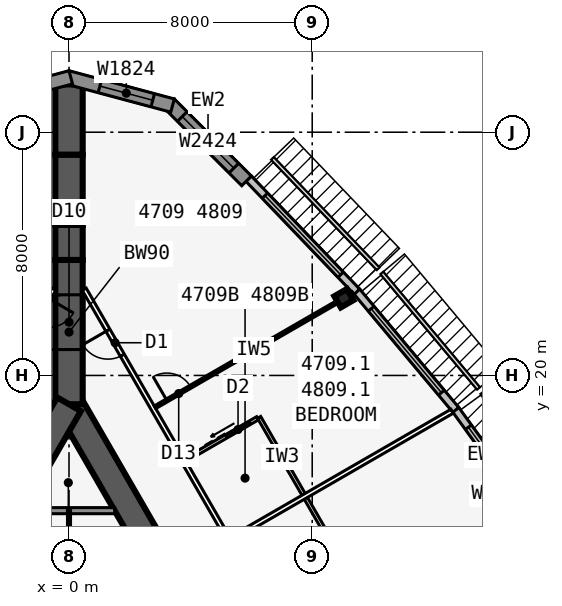
"""IFC4 building model, lengths in metres.
Left out: names, types, materials, properties, quantities, classifications, styles, units other than length and angle.
Written with IfcOpenShell. Run it as: python <this file> out.ifc"""

import sys

from ifc_helpers import new_model, si_unit, direction, frame, frame_2d, origin, origin_2d, place, context, subcontext, project, spatial, polyline, rectangle, i_section, outline, extrude, element, fill, save


model = new_model("IFC4")
c1 = context("Model", 3, precision=1e-05, world=origin(), true_north=direction((0.0, 1.0)))
c2 = subcontext(c1, "Body", "Model", "MODEL_VIEW")
j1 = project(units=[si_unit("LENGTHUNIT", "METRE"), si_unit("PLANEANGLEUNIT", "RADIAN")], contexts=[c1])
p1 = place(None, origin())
s1 = spatial("IfcSite", under=j1, at=p1, CompositionType="ELEMENT")
p2 = place(p1, origin())
s2 = spatial("IfcBuilding", under=s1, at=p2, CompositionType="ELEMENT")
p3 = place(p2, frame((0.0, 0.0, 175.9)))
s3 = spatial("IfcBuildingStorey", under=s2, at=p3, CompositionType="ELEMENT", Elevation=175.9)
p4 = place(p3, frame((16.5, -9.526, 0.0), z_axis=(0.0, 0.0, 1.0), x_axis=(-0.499999749417, 0.866025548458, 0.0)))
e1 = element("IfcWall", 1, at=p4, inside=s3, PredefinedType="SHEAR", context=c2, shape_type="SweptSolid", body=[
    extrude(rectangle(XDim=33.0, YDim=0.9, at=frame_2d((16.5, 0.0))), origin(), (0.0, 0.0, 1.0), 3.4),
])
p5 = place(p4, frame((14.15, 0.0, 0.0)))
e2 = element("IfcOpeningElement", 2, at=p5, cuts=e1, PredefinedType="OPENING", context=c2, shape_type="SweptSolid", body=[
    extrude(rectangle(XDim=1.8, YDim=2.13, at=frame_2d((0.9, 1.065))), frame((0.0, 0.46, 0.0), z_axis=(0.0, -1.0, 0.0), x_axis=(1.0, 0.0, 0.0)), (0.0, 0.0, 1.0), 0.92),
])
p6 = place(p4, frame((12.6, 0.0, 0.0)))
e3 = element("IfcOpeningElement", 3, at=p6, cuts=e1, PredefinedType="OPENING", context=c2, shape_type="SweptSolid", body=[
    extrude(rectangle(XDim=1.0, YDim=2.13, at=frame_2d((0.5, 1.065))), frame((0.0, 0.46, 0.0), z_axis=(0.0, -1.0, 0.0), x_axis=(1.0, 0.0, 0.0)), (0.0, 0.0, 1.0), 0.92),
])
p7 = place(p3, frame((0.0, 19.052, 0.0), z_axis=(0.0, 0.0, 1.0), x_axis=(-0.499999749417, -0.866025548458, 0.0)))
e4 = element("IfcWall", 4, at=p7, inside=s3, PredefinedType="SHEAR", context=c2, shape_type="SweptSolid", body=[
    extrude(rectangle(XDim=33.0, YDim=0.9, at=frame_2d((16.5, 0.0))), origin(), (0.0, 0.0, 1.0), 3.4),
])
p8 = place(p7, frame((14.15, 0.0, 0.0)))
e5 = element("IfcOpeningElement", 5, at=p8, cuts=e4, PredefinedType="OPENING", context=c2, shape_type="SweptSolid", body=[
    extrude(rectangle(XDim=1.8, YDim=2.13, at=frame_2d((0.9, 1.065))), frame((0.0, 0.46, 0.0), z_axis=(0.0, -1.0, 0.0), x_axis=(1.0, 0.0, 0.0)), (0.0, 0.0, 1.0), 0.92),
])
p9 = place(p7, frame((12.6, 0.0, 0.0)))
e6 = element("IfcOpeningElement", 6, at=p9, cuts=e4, PredefinedType="OPENING", context=c2, shape_type="SweptSolid", body=[
    extrude(rectangle(XDim=1.0, YDim=2.13, at=frame_2d((0.5, 1.065))), frame((0.0, 0.46, 0.0), z_axis=(0.0, -1.0, 0.0), x_axis=(1.0, 0.0, 0.0)), (0.0, 0.0, 1.0), 0.92),
])
p10 = place(p3, frame((0.0, 19.052, 0.0), z_axis=(0.0, 0.0, 1.0), x_axis=(0.0, 1.0, 0.0)))
e7 = element("IfcWall", 7, at=p10, inside=s3, PredefinedType="SHEAR", context=c2, shape_type="SweptSolid", body=[
    extrude(rectangle(XDim=4.746, YDim=0.9, at=frame_2d((2.373, 0.0))), origin(), (0.0, 0.0, 1.0), 3.4),
])
p11 = place(p10, frame((1.8, 0.0, 0.0)))
e8 = element("IfcOpeningElement", 8, at=p11, cuts=e7, PredefinedType="OPENING", context=c2, shape_type="SweptSolid", body=[
    extrude(rectangle(XDim=1.8, YDim=2.13, at=frame_2d((0.9, 1.065))), frame((0.0, 0.46, 0.0), z_axis=(0.0, -1.0, 0.0), x_axis=(1.0, 0.0, 0.0)), (0.0, 0.0, 1.0), 0.92),
])
p12 = place(p3, frame((0.0, 23.799, 0.0), z_axis=(0.0, 0.0, 1.0), x_axis=(0.0, 1.0, 0.0)))
e9 = element("IfcWall", 9, at=p12, inside=s3, PredefinedType="SHEAR", context=c2, shape_type="SweptSolid", body=[
    extrude(rectangle(XDim=1.155, YDim=0.9, at=frame_2d((0.577, 0.0))), origin(), (0.0, 0.0, 1.0), 3.4),
])
p13 = place(p3, frame((0.0, 24.953, 0.0), z_axis=(0.0, 0.0, 1.0), x_axis=(0.0, 1.0, 0.0)))
e10 = element("IfcWall", 10, at=p13, inside=s3, PredefinedType="SHEAR", context=c2, shape_type="SweptSolid", body=[
    extrude(rectangle(XDim=2.309, YDim=0.9, at=frame_2d((1.155, 0.0))), origin(), (0.0, 0.0, 1.0), 3.4),
])
p14 = place(p3, frame((0.0, 27.263, 0.0), z_axis=(0.0, 0.0, 1.0), x_axis=(0.0, 1.0, 0.0)))
e11 = element("IfcWall", 11, at=p14, inside=s3, PredefinedType="SHEAR", context=c2, shape_type="SweptSolid", body=[
    extrude(rectangle(XDim=2.31, YDim=0.9, at=frame_2d((1.155, 0.0))), origin(), (0.0, 0.0, 1.0), 3.4),
])
p15 = place(p3, frame((9.041, 22.541, 0.0), z_axis=(0.0, 0.0, 1.0), x_axis=(-0.5, 0.866025403784, 0.0)))
e12 = element("IfcColumn", 12, at=p15, inside=s3, PredefinedType="COLUMN", context=c2, shape_type="SweptSolid", body=[
    extrude(i_section(OverallWidth=0.424, OverallDepth=0.475, WebThickness=0.048, FlangeThickness=0.077, at=origin_2d()), origin(), (0.0, 0.0, 1.0), 3.4),
])
p16 = place(p3, frame((15.672, 14.807, 0.0), z_axis=(0.0, 0.0, 1.0), x_axis=(-0.587669188412, 0.809101307001, 0.0)))
e13 = element("IfcWall", 13, at=p16, inside=s3, PredefinedType="STANDARD", context=c2, shape_type="SweptSolid", body=[
    extrude(rectangle(XDim=5.028, YDim=0.25, at=frame_2d((2.514, 0.0))), origin(), (0.0, 0.0, 1.0), 3.235),
])
p17 = place(p16, frame((0.714, 0.0, 0.45)))
e14 = element("IfcOpeningElement", 14, at=p17, cuts=e13, PredefinedType="OPENING", context=c2, shape_type="SweptSolid", body=[
    extrude(rectangle(XDim=3.6, YDim=2.4, at=frame_2d((1.8, 1.2))), frame((0.0, 0.135, 0.0), z_axis=(0.0, -1.0, 0.0), x_axis=(1.0, 0.0, 0.0)), (0.0, 0.0, 1.0), 0.27),
])
p18 = place(p3, frame((12.723, 18.868, 0.0), z_axis=(0.0, 0.0, 1.0), x_axis=(-0.641810386606, 0.766863369607, 0.0)))
e15 = element("IfcWall", 15, at=p18, inside=s3, PredefinedType="STANDARD", context=c2, shape_type="SweptSolid", body=[
    extrude(rectangle(XDim=5.076, YDim=0.25, at=frame_2d((2.538, 0.0))), origin(), (0.0, 0.0, 1.0), 3.235),
])
p19 = place(p18, frame((0.738, 0.0, 0.45)))
e16 = element("IfcOpeningElement", 16, at=p19, cuts=e15, PredefinedType="OPENING", context=c2, shape_type="SweptSolid", body=[
    extrude(rectangle(XDim=3.6, YDim=2.4, at=frame_2d((1.8, 1.2))), frame((0.0, 0.135, 0.0), z_axis=(0.0, -1.0, 0.0), x_axis=(1.0, 0.0, 0.0)), (0.0, 0.0, 1.0), 0.27),
])
p20 = place(p3, frame((9.471, 22.754, 0.0), z_axis=(0.0, 0.0, 1.0), x_axis=(-0.691719937936, 0.722165858693, 0.0)))
e17 = element("IfcWall", 17, at=p20, inside=s3, PredefinedType="STANDARD", context=c2, shape_type="SweptSolid", body=[
    extrude(rectangle(XDim=5.148, YDim=0.25, at=frame_2d((2.574, 0.0))), origin(), (0.0, 0.0, 1.0), 3.235),
])
p21 = place(p20, frame((0.774, 0.0, 0.45)))
e18 = element("IfcOpeningElement", 18, at=p21, cuts=e17, PredefinedType="OPENING", context=c2, shape_type="SweptSolid", body=[
    extrude(rectangle(XDim=3.6, YDim=2.4, at=frame_2d((1.8, 1.2))), frame((0.0, 0.135, 0.0), z_axis=(0.0, -1.0, 0.0), x_axis=(1.0, 0.0, 0.0)), (0.0, 0.0, 1.0), 0.27),
])
p22 = place(p3, frame((5.841, 26.399, 0.0), z_axis=(0.0, 0.0, 1.0), x_axis=(-0.707106781187, 0.707106781187, 0.0)))
e19 = element("IfcWall", 19, at=p22, inside=s3, PredefinedType="SOLIDWALL", context=c2, shape_type="SweptSolid", body=[
    extrude(rectangle(XDim=3.586, YDim=0.45, at=frame_2d((1.793, 0.0))), origin(), (0.0, 0.0, 1.0), 3.235),
])
p23 = place(p22, frame((0.593, 0.0, 0.45)))
e20 = element("IfcOpeningElement", 20, at=p23, cuts=e19, PredefinedType="OPENING", context=c2, shape_type="SweptSolid", body=[
    extrude(rectangle(XDim=2.4, YDim=2.4, at=frame_2d((1.2, 1.2))), frame((0.0, 0.235, 0.0), z_axis=(0.0, -1.0, 0.0), x_axis=(1.0, 0.0, 0.0)), (0.0, 0.0, 1.0), 0.47),
])
p24 = place(p3, frame((3.406, 28.877, 0.0), z_axis=(0.0, 0.0, 1.0), x_axis=(-0.965924653531, 0.258823421857, 0.0)))
e21 = element("IfcWall", 21, at=p24, inside=s3, PredefinedType="SOLIDWALL", context=c2, shape_type="SweptSolid", body=[
    extrude(outline(polyline([(3.586, 0.225), (3.527, 0.225), (3.035, 0.093), (3.0, 0.225), (0.0, 0.225), (0.0, -0.225), (3.586, -0.225), (3.586, 0.225)])), origin(), (0.0, 0.0, 1.0), 3.235),
])
p25 = place(p24, frame((0.675, 0.0, 0.45)))
e22 = element("IfcOpeningElement", 22, at=p25, cuts=e21, PredefinedType="OPENING", context=c2, shape_type="SweptSolid", body=[
    extrude(rectangle(XDim=1.8, YDim=2.4, at=frame_2d((0.9, 1.2))), frame((0.0, 0.235, 0.0), z_axis=(0.0, -1.0, 0.0), x_axis=(1.0, 0.0, 0.0)), (0.0, 0.0, 1.0), 0.47),
])
p26 = place(p3, frame((0.058, 29.805, 0.0), z_axis=(0.0, 0.0, 1.0), x_axis=(-0.965924653531, -0.258823421857, 0.0)))
e23 = element("IfcWall", 23, at=p26, inside=s3, PredefinedType="SOLIDWALL", context=c2, shape_type="SweptSolid", body=[
    extrude(outline(polyline([(3.586, 0.225), (0.586, 0.225), (0.551, 0.093), (0.06, 0.225), (0.0, 0.225), (0.0, -0.225), (3.586, -0.225), (3.586, 0.225)])), origin(), (0.0, 0.0, 1.0), 3.235),
])
p27 = place(p26, frame((1.111, 0.0, 0.45)))
e24 = element("IfcOpeningElement", 24, at=p27, cuts=e23, PredefinedType="OPENING", context=c2, shape_type="SweptSolid", body=[
    extrude(rectangle(XDim=1.8, YDim=2.4, at=frame_2d((0.9, 1.2))), frame((0.0, 0.235, 0.0), z_axis=(0.0, -1.0, 0.0), x_axis=(1.0, 0.0, 0.0)), (0.0, 0.0, 1.0), 0.47),
])
p28 = place(p3, frame((20.027, -10.985, 0.0), z_axis=(0.0, 0.0, 1.0), x_axis=(-0.500001677587, 0.866024435227, 0.0)))
e25 = element("IfcWall", 25, at=p28, inside=s3, PredefinedType="PARTITIONING", context=c2, shape_type="SweptSolid", body=[
    extrude(rectangle(XDim=39.054, YDim=0.15, at=frame_2d((19.527, 0.0))), origin(), (0.0, 0.0, 1.0), 3.235),
])
p29 = place(p28, frame((1.558, 0.0, 0.0)))
e26 = element("IfcOpeningElement", 26, at=p29, cuts=e25, PredefinedType="OPENING", context=c2, shape_type="SweptSolid", body=[
    extrude(rectangle(XDim=0.95, YDim=2.13, at=frame_2d((0.475, 1.065))), frame((0.0, 0.085, 0.0), z_axis=(0.0, -1.0, 0.0), x_axis=(1.0, 0.0, 0.0)), (0.0, 0.0, 1.0), 0.17),
])
p30 = place(p28, frame((11.552, 0.0, 0.0)))
e27 = element("IfcOpeningElement", 27, at=p30, cuts=e25, PredefinedType="OPENING", context=c2, shape_type="SweptSolid", body=[
    extrude(rectangle(XDim=0.95, YDim=2.13, at=frame_2d((0.475, 1.065))), frame((0.0, 0.085, 0.0), z_axis=(0.0, -1.0, 0.0), x_axis=(1.0, 0.0, 0.0)), (0.0, 0.0, 1.0), 0.17),
])
p31 = place(p28, frame((25.352, 0.0, 0.0)))
e28 = element("IfcOpeningElement", 28, at=p31, cuts=e25, PredefinedType="OPENING", context=c2, shape_type="SweptSolid", body=[
    extrude(rectangle(XDim=0.95, YDim=2.13, at=frame_2d((0.475, 1.065))), frame((0.0, 0.085, 0.0), z_axis=(0.0, -1.0, 0.0), x_axis=(1.0, 0.0, 0.0)), (0.0, 0.0, 1.0), 0.17),
])
p32 = place(p28, frame((36.546, 0.0, 0.0)))
e29 = element("IfcOpeningElement", 29, at=p32, cuts=e25, PredefinedType="OPENING", context=c2, shape_type="SweptSolid", body=[
    extrude(rectangle(XDim=0.95, YDim=2.13, at=frame_2d((0.475, 1.065))), frame((0.0, 0.085, 0.0), z_axis=(0.0, -1.0, 0.0), x_axis=(1.0, 0.0, 0.0)), (0.0, 0.0, 1.0), 0.17),
])
p33 = place(p3, frame((5.329, 14.623, 0.0), z_axis=(0.0, 0.0, 1.0), x_axis=(0.866011723728, 0.500023693804, 0.0)))
e30 = element("IfcWall", 30, at=p33, inside=s3, PredefinedType="PARTITIONING", context=c2, shape_type="SweptSolid", body=[
    extrude(rectangle(XDim=8.395, YDim=0.15, at=frame_2d((4.198, 0.0))), origin(), (0.0, 0.0, 1.0), 2.389),
])
p34 = place(p3, frame((2.829, 18.954, 0.0), z_axis=(0.0, 0.0, 1.0), x_axis=(0.866015739374, 0.500016738876, 0.0)))
e31 = element("IfcWall", 31, at=p34, inside=s3, PredefinedType="PARTITIONING", context=c2, shape_type="SweptSolid", body=[
    extrude(rectangle(XDim=7.516, YDim=0.1, at=frame_2d((3.758, 0.0))), origin(), (0.0, 0.0, 1.0), 2.389),
])
p35 = place(p34, frame((0.45, 0.0, 0.0)))
e32 = element("IfcOpeningElement", 32, at=p35, cuts=e31, PredefinedType="OPENING", context=c2, shape_type="SweptSolid", body=[
    extrude(rectangle(XDim=0.9, YDim=2.13, at=frame_2d((0.45, 1.065))), frame((0.0, 0.06, 0.0), z_axis=(0.0, -1.0, 0.0), x_axis=(1.0, 0.0, 0.0)), (0.0, 0.0, 1.0), 0.12),
])
for number, where, z_axis, x_axis in (
    (33, (9.253, 13.425, 0.0), (0.0, 0.0, 1.0), (-0.5, 0.866, 0.0)),
    (34, (7.753, 16.023, 0.0), (0.0, 0.0, 1.0), (-0.5, 0.866, 0.0)),
):
    element("IfcWall", number, at=place(p3, frame(where, z_axis=z_axis, x_axis=x_axis)), inside=s3, PredefinedType="PLUMBINGWALL", context=c2, shape_type="SweptSolid", body=[
        extrude(rectangle(XDim=3.0, YDim=0.12, at=frame_2d((1.5, 0.0))), origin(), (0.0, 0.0, 1.0), 3.235),
    ])
p36 = place(p3, frame((3.829, 17.221, 0.0), z_axis=(0.0, 0.0, 1.0), x_axis=(0.865997131366, 0.500048966069, 0.0)))
e35 = element("IfcWall", 35, at=p36, inside=s3, PredefinedType="PLUMBINGWALL", context=c2, shape_type="SweptSolid", body=[
    extrude(rectangle(XDim=2.74, YDim=0.12, at=frame_2d((1.37, 0.0))), origin(), (0.0, 0.0, 1.0), 3.235),
])
p37 = place(p36, frame((1.55, 0.0, 0.0)))
e36 = element("IfcOpeningElement", 36, at=p37, cuts=e35, PredefinedType="OPENING", context=c2, shape_type="SweptSolid", body=[
    extrude(rectangle(XDim=0.9, YDim=2.13, at=frame_2d((0.45, 1.065))), frame((0.0, 0.07, 0.0), z_axis=(0.0, -1.0, 0.0), x_axis=(1.0, 0.0, 0.0)), (0.0, 0.0, 1.0), 0.14),
])
p38 = place(p3, frame((-0.5, 22.836, 0.0), z_axis=(0.0, 0.0, 1.0), x_axis=(-0.500001677587, -0.866024435227, 0.0)))
e37 = element("IfcWall", 37, at=p38, inside=s3, PredefinedType="PARTITIONING", context=c2, shape_type="SweptSolid", body=[
    extrude(rectangle(XDim=39.054, YDim=0.15, at=frame_2d((19.527, 0.0))), origin(), (0.0, 0.0, 1.0), 3.235),
])
p39 = place(p38, frame((0.352, 0.0, 0.0)))
e38 = element("IfcOpeningElement", 38, at=p39, cuts=e37, PredefinedType="OPENING", context=c2, shape_type="SweptSolid", body=[
    extrude(rectangle(XDim=0.95, YDim=2.13, at=frame_2d((0.475, 1.065))), frame((0.0, 0.085, 0.0), z_axis=(0.0, -1.0, 0.0), x_axis=(1.0, 0.0, 0.0)), (0.0, 0.0, 1.0), 0.17),
])
p40 = place(p38, frame((6.552, 0.0, 0.0)))
e39 = element("IfcOpeningElement", 39, at=p40, cuts=e37, PredefinedType="OPENING", context=c2, shape_type="SweptSolid", body=[
    extrude(rectangle(XDim=0.95, YDim=2.13, at=frame_2d((0.475, 1.065))), frame((0.0, 0.085, 0.0), z_axis=(0.0, -1.0, 0.0), x_axis=(1.0, 0.0, 0.0)), (0.0, 0.0, 1.0), 0.17),
])
p41 = place(p38, frame((15.952, 0.0, 0.0)))
e40 = element("IfcOpeningElement", 40, at=p41, cuts=e37, PredefinedType="OPENING", context=c2, shape_type="SweptSolid", body=[
    extrude(rectangle(XDim=0.95, YDim=2.13, at=frame_2d((0.475, 1.065))), frame((0.0, 0.085, 0.0), z_axis=(0.0, -1.0, 0.0), x_axis=(1.0, 0.0, 0.0)), (0.0, 0.0, 1.0), 0.17),
])
p42 = place(p38, frame((21.552, 0.0, 0.0)))
e41 = element("IfcOpeningElement", 41, at=p42, cuts=e37, PredefinedType="OPENING", context=c2, shape_type="SweptSolid", body=[
    extrude(rectangle(XDim=0.95, YDim=2.13, at=frame_2d((0.475, 1.065))), frame((0.0, 0.085, 0.0), z_axis=(0.0, -1.0, 0.0), x_axis=(1.0, 0.0, 0.0)), (0.0, 0.0, 1.0), 0.17),
])
p43 = place(p38, frame((30.952, 0.0, 0.0)))
e42 = element("IfcOpeningElement", 42, at=p43, cuts=e37, PredefinedType="OPENING", context=c2, shape_type="SweptSolid", body=[
    extrude(rectangle(XDim=0.95, YDim=2.13, at=frame_2d((0.475, 1.065))), frame((0.0, 0.085, 0.0), z_axis=(0.0, -1.0, 0.0), x_axis=(1.0, 0.0, 0.0)), (0.0, 0.0, 1.0), 0.17),
])
p44 = place(p38, frame((37.752, 0.0, 0.0)))
e43 = element("IfcOpeningElement", 43, at=p44, cuts=e37, PredefinedType="OPENING", context=c2, shape_type="SweptSolid", body=[
    extrude(rectangle(XDim=0.95, YDim=2.13, at=frame_2d((0.475, 1.065))), frame((0.0, 0.085, 0.0), z_axis=(0.0, -1.0, 0.0), x_axis=(1.0, 0.0, 0.0)), (0.0, 0.0, 1.0), 0.17),
])
p45 = place(p3, frame((-1.501, 15.552, 0.0), z_axis=(0.0, 0.0, 1.0), x_axis=(1.0, 0.0, 0.0)))
e44 = element("IfcWall", 44, at=p45, inside=s3, PredefinedType="SOLIDWALL", context=c2, shape_type="SweptSolid", body=[
    extrude(rectangle(XDim=3.002, YDim=0.2, at=frame_2d((1.501, 0.0))), origin(), (0.0, 0.0, 1.0), 3.235),
])
p46 = place(p3, frame((0.0, 15.552, 0.0), z_axis=(0.0, 0.0, 1.0), x_axis=(0.0, -1.0, 0.0)))
e45 = element("IfcWall", 45, at=p46, inside=s3, PredefinedType="PARTITIONING", context=c2, shape_type="SweptSolid", body=[
    extrude(rectangle(XDim=3.775, YDim=0.1, at=frame_2d((1.888, 0.0))), origin(), (0.0, 0.0, 1.0), 3.235),
])
p47 = place(p46, frame((1.815, 0.0, 0.0)))
e46 = element("IfcOpeningElement", 46, at=p47, cuts=e45, PredefinedType="OPENING", context=c2, shape_type="SweptSolid", body=[
    extrude(rectangle(XDim=0.9, YDim=2.13, at=frame_2d((0.45, 1.065))), frame((0.0, 0.06, 0.0), z_axis=(0.0, -1.0, 0.0), x_axis=(1.0, 0.0, 0.0)), (0.0, 0.0, 1.0), 0.12),
])
p48 = place(p17, origin())
e47 = element("IfcWindow", 47, at=p48, inside=s3, PartitioningType="SINGLE_PANEL", PredefinedType="WINDOW", context=c2, shape_type="SweptSolid", body=[
    extrude(rectangle(XDim=3.6, YDim=2.4, at=frame_2d((1.8, 1.2))), frame((0.0, 0.03, 0.0), z_axis=(0.0, -1.0, 0.0), x_axis=(1.0, 0.0, 0.0)), (0.0, 0.0, 1.0), 0.06),
])
fill(e14, e47)
p49 = place(p19, origin())
e48 = element("IfcWindow", 48, at=p49, inside=s3, PartitioningType="SINGLE_PANEL", PredefinedType="WINDOW", context=c2, shape_type="SweptSolid", body=[
    extrude(rectangle(XDim=3.6, YDim=2.4, at=frame_2d((1.8, 1.2))), frame((0.0, 0.03, 0.0), z_axis=(0.0, -1.0, 0.0), x_axis=(1.0, 0.0, 0.0)), (0.0, 0.0, 1.0), 0.06),
])
fill(e16, e48)
p50 = place(p21, origin())
e49 = element("IfcWindow", 49, at=p50, inside=s3, PartitioningType="SINGLE_PANEL", PredefinedType="WINDOW", context=c2, shape_type="SweptSolid", body=[
    extrude(rectangle(XDim=3.6, YDim=2.4, at=frame_2d((1.8, 1.2))), frame((0.0, 0.03, 0.0), z_axis=(0.0, -1.0, 0.0), x_axis=(1.0, 0.0, 0.0)), (0.0, 0.0, 1.0), 0.06),
])
fill(e18, e49)
p51 = place(p23, origin())
e50 = element("IfcWindow", 50, at=p51, inside=s3, PartitioningType="SINGLE_PANEL", PredefinedType="WINDOW", context=c2, shape_type="SweptSolid", body=[
    extrude(rectangle(XDim=2.4, YDim=2.4, at=frame_2d((1.2, 1.2))), frame((0.0, 0.03, 0.0), z_axis=(0.0, -1.0, 0.0), x_axis=(1.0, 0.0, 0.0)), (0.0, 0.0, 1.0), 0.06),
])
fill(e20, e50)
p52 = place(p25, origin())
e51 = element("IfcWindow", 51, at=p52, inside=s3, PartitioningType="SINGLE_PANEL", PredefinedType="WINDOW", context=c2, shape_type="SweptSolid", body=[
    extrude(rectangle(XDim=1.8, YDim=2.4, at=frame_2d((0.9, 1.2))), frame((0.0, 0.03, 0.0), z_axis=(0.0, -1.0, 0.0), x_axis=(1.0, 0.0, 0.0)), (0.0, 0.0, 1.0), 0.06),
])
fill(e22, e51)
p53 = place(p35, origin())
e52 = element("IfcDoor", 52, at=p53, inside=s3, OperationType="SINGLE_SWING_LEFT", PredefinedType="DOOR", context=c2, shape_type="SweptSolid", body=[
    extrude(rectangle(XDim=0.9, YDim=2.13, at=frame_2d((0.45, 1.065))), frame((0.0, 0.025, 0.0), z_axis=(0.0, -1.0, 0.0), x_axis=(1.0, 0.0, 0.0)), (0.0, 0.0, 1.0), 0.05),
])
fill(e32, e52)
p54 = place(p37, origin())
e53 = element("IfcDoor", 53, at=p54, inside=s3, OperationType="SLIDING_TO_LEFT", PredefinedType="DOOR", context=c2, shape_type="SweptSolid", body=[
    extrude(rectangle(XDim=0.9, YDim=2.13, at=frame_2d((0.45, 1.065))), frame((0.0, 0.025, 0.0), z_axis=(0.0, -1.0, 0.0), x_axis=(1.0, 0.0, 0.0)), (0.0, 0.0, 1.0), 0.05),
])
fill(e36, e53)
p55 = place(p32, origin())
e54 = element("IfcDoor", 54, at=p55, inside=s3, OperationType="SINGLE_SWING_RIGHT", PredefinedType="DOOR", context=c2, shape_type="SweptSolid", body=[
    extrude(rectangle(XDim=0.95, YDim=2.13, at=frame_2d((0.475, 1.065))), frame((0.0, 0.025, 0.0), z_axis=(0.0, -1.0, 0.0), x_axis=(1.0, 0.0, 0.0)), (0.0, 0.0, 1.0), 0.05),
])
fill(e29, e54)
p56 = place(p11, origin())
e55 = element("IfcDoor", 55, at=p56, inside=s3, OperationType="DOUBLE_DOOR_DOUBLE_SWING", PredefinedType="DOOR", context=c2, shape_type="SweptSolid", body=[
    extrude(rectangle(XDim=1.8, YDim=2.13, at=frame_2d((0.9, 1.065))), frame((0.0, 0.025, 0.0), z_axis=(0.0, -1.0, 0.0), x_axis=(1.0, 0.0, 0.0)), (0.0, 0.0, 1.0), 0.05),
])
fill(e8, e55)
save(model, sys.argv[1])
